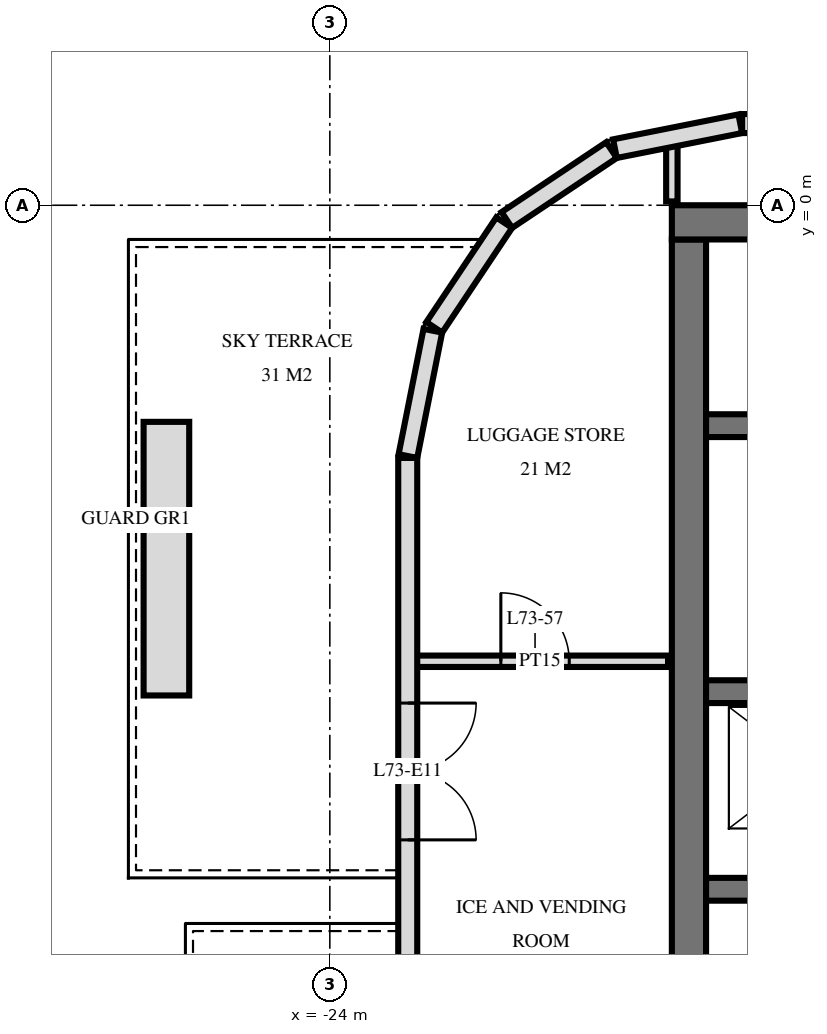
"""IFC4 building model, lengths in metres.
Left out: names, types, materials, properties, quantities, classifications, styles, units other than length and angle.
Written with IfcOpenShell. Run it as: python <this file> out.ifc"""

import sys

from ifc_helpers import new_model, si_unit, direction, frame, frame_2d, origin, place, context, subcontext, project, spatial, rectangle, extrude, element, fill, save


model = new_model("IFC4")
c1 = context("Model", 3, precision=1e-05, world=origin(), true_north=direction((0.0, 1.0)))
c2 = subcontext(c1, "Body", "Model", "MODEL_VIEW")
j1 = project(units=[si_unit("LENGTHUNIT", "METRE"), si_unit("PLANEANGLEUNIT", "RADIAN")], contexts=[c1])
p1 = place(None, origin())
s1 = spatial("IfcSite", under=j1, at=p1, CompositionType="ELEMENT")
p2 = place(p1, origin())
s2 = spatial("IfcBuilding", under=s1, at=p2, CompositionType="ELEMENT")
p3 = place(p2, frame((0.0, 0.0, 277.1)))
s3 = spatial("IfcBuildingStorey", under=s2, at=p3, CompositionType="ELEMENT", Elevation=277.1)
p4 = place(p3, frame((-19.5, -0.225, 0.0), z_axis=(0.0, 0.0, 1.0), x_axis=(1.0, 0.0, 0.0)))
e1 = element("IfcWall", 1, at=p4, inside=s3, PredefinedType="SHEAR", context=c2, shape_type="SweptSolid", body=[
    extrude(rectangle(XDim=9.5, YDim=0.45, at=frame_2d((4.75, 0.0))), origin(), (0.0, 0.0, 1.0), 3.5),
])
p5 = place(p3, frame((-19.275, -14.55, 0.0), z_axis=(0.0, 0.0, 1.0), x_axis=(0.0, 1.0, 0.0)))
e2 = element("IfcWall", 2, at=p5, inside=s3, PredefinedType="SHEAR", context=c2, shape_type="SweptSolid", body=[
    extrude(rectangle(XDim=14.1, YDim=0.45, at=frame_2d((7.05, 0.0))), origin(), (0.0, 0.0, 1.0), 3.5),
])
p6 = place(p3, frame((-19.05, -2.9, 0.0), z_axis=(0.0, 0.0, 1.0), x_axis=(1.0, 0.0, 0.0)))
e3 = element("IfcWall", 3, at=p6, inside=s3, PredefinedType="SHEAR", context=c2, shape_type="SweptSolid", body=[
    extrude(rectangle(XDim=8.7, YDim=0.3, at=frame_2d((4.35, 0.0))), origin(), (0.0, 0.0, 1.0), 3.5),
])
p7 = place(p6, frame((6.8, 0.0, 0.0)))
e4 = element("IfcOpeningElement", 4, at=p7, cuts=e3, PredefinedType="OPENING", context=c2, shape_type="SweptSolid", body=[
    extrude(rectangle(XDim=1.1, YDim=2.1, at=frame_2d((0.55, 1.05))), frame((0.0, 0.16, 0.0), z_axis=(0.0, -1.0, 0.0), x_axis=(1.0, 0.0, 0.0)), (0.0, 0.0, 1.0), 0.32),
])
p8 = place(p6, frame((3.8, 0.0, 0.0)))
e5 = element("IfcOpeningElement", 5, at=p8, cuts=e3, PredefinedType="OPENING", context=c2, shape_type="SweptSolid", body=[
    extrude(rectangle(XDim=1.1, YDim=2.1, at=frame_2d((0.55, 1.05))), frame((0.0, 0.16, 0.0), z_axis=(0.0, -1.0, 0.0), x_axis=(1.0, 0.0, 0.0)), (0.0, 0.0, 1.0), 0.32),
])
p9 = place(p6, frame((0.9, 0.0, 0.0)))
e6 = element("IfcOpeningElement", 6, at=p9, cuts=e3, PredefinedType="OPENING", context=c2, shape_type="SweptSolid", body=[
    extrude(rectangle(XDim=0.9, YDim=2.1, at=frame_2d((0.45, 1.05))), frame((0.0, 0.16, 0.0), z_axis=(0.0, -1.0, 0.0), x_axis=(1.0, 0.0, 0.0)), (0.0, 0.0, 1.0), 0.32),
])
p10 = place(p3, frame((-19.05, -6.4, 0.0), z_axis=(0.0, 0.0, 1.0), x_axis=(1.0, 0.0, 0.0)))
e7 = element("IfcWall", 7, at=p10, inside=s3, PredefinedType="SHEAR", context=c2, shape_type="SweptSolid", body=[
    extrude(rectangle(XDim=8.7, YDim=0.3, at=frame_2d((4.35, 0.0))), origin(), (0.0, 0.0, 1.0), 3.5),
])
p11 = place(p10, frame((0.8, 0.0, 0.0)))
e8 = element("IfcOpeningElement", 8, at=p11, cuts=e7, PredefinedType="OPENING", context=c2, shape_type="SweptSolid", body=[
    extrude(rectangle(XDim=1.1, YDim=2.1, at=frame_2d((0.55, 1.05))), frame((0.0, 0.16, 0.0), z_axis=(0.0, -1.0, 0.0), x_axis=(1.0, 0.0, 0.0)), (0.0, 0.0, 1.0), 0.32),
])
p12 = place(p3, frame((-19.05, -9.0, 0.0), z_axis=(0.0, 0.0, 1.0), x_axis=(1.0, 0.0, 0.0)))
e9 = element("IfcWall", 9, at=p12, inside=s3, PredefinedType="SHEAR", context=c2, shape_type="SweptSolid", body=[
    extrude(rectangle(XDim=8.7, YDim=0.3, at=frame_2d((4.35, 0.0))), origin(), (0.0, 0.0, 1.0), 3.5),
])
p13 = place(p12, frame((3.8, 0.0, 0.0)))
e10 = element("IfcOpeningElement", 10, at=p13, cuts=e9, PredefinedType="OPENING", context=c2, shape_type="SweptSolid", body=[
    extrude(rectangle(XDim=1.1, YDim=2.1, at=frame_2d((0.55, 1.05))), frame((0.0, 0.16, 0.0), z_axis=(0.0, -1.0, 0.0), x_axis=(1.0, 0.0, 0.0)), (0.0, 0.0, 1.0), 0.32),
])
p14 = place(p3, frame((18.575, 1.075, 0.0), z_axis=(0.0, 0.0, 1.0), x_axis=(-1.0, 0.0, 0.0)))
e11 = element("IfcWall", 11, at=p14, inside=s3, PredefinedType="SOLIDWALL", context=c2, shape_type="SweptSolid", body=[
    extrude(rectangle(XDim=37.151, YDim=0.25, at=frame_2d((18.575, 0.0))), origin(), (0.0, 0.0, 1.0), 3.22),
])
p15 = place(p14, frame((15.275, 0.0, 0.9)))
e12 = element("IfcOpeningElement", 12, at=p15, cuts=e11, PredefinedType="OPENING", context=c2, shape_type="SweptSolid", body=[
    extrude(rectangle(XDim=2.4, YDim=1.5, at=frame_2d((1.2, 0.75))), frame((0.0, 0.135, 0.0), z_axis=(0.0, -1.0, 0.0), x_axis=(1.0, 0.0, 0.0)), (0.0, 0.0, 1.0), 0.27),
])
p16 = place(p14, frame((21.275, 0.0, 0.9)))
e13 = element("IfcOpeningElement", 13, at=p16, cuts=e11, PredefinedType="OPENING", context=c2, shape_type="SweptSolid", body=[
    extrude(rectangle(XDim=2.4, YDim=1.5, at=frame_2d((1.2, 0.75))), frame((0.0, 0.135, 0.0), z_axis=(0.0, -1.0, 0.0), x_axis=(1.0, 0.0, 0.0)), (0.0, 0.0, 1.0), 0.27),
])
p17 = place(p14, frame((24.275, 0.0, 0.9)))
e14 = element("IfcOpeningElement", 14, at=p17, cuts=e11, PredefinedType="OPENING", context=c2, shape_type="SweptSolid", body=[
    extrude(rectangle(XDim=2.4, YDim=1.5, at=frame_2d((1.2, 0.75))), frame((0.0, 0.135, 0.0), z_axis=(0.0, -1.0, 0.0), x_axis=(1.0, 0.0, 0.0)), (0.0, 0.0, 1.0), 0.27),
])
p18 = place(p3, frame((-18.6, 1.073, 0.0), z_axis=(0.0, 0.0, 1.0), x_axis=(-0.980797896849, -0.195026884138, 0.0)))
e15 = element("IfcWall", 15, at=p18, inside=s3, PredefinedType="SOLIDWALL", context=c2, shape_type="SweptSolid", body=[
    extrude(rectangle(XDim=1.681, YDim=0.25, at=frame_2d((0.841, 0.0))), origin(), (0.0, 0.0, 1.0), 3.22),
])
for number, where, z_axis, x_axis in (
    (16, (-20.294, 0.726, 0.0), (0.0, 0.0, 1.0), (-0.831, -0.556, 0.0)),
    (17, (-21.706, -0.229, 0.0), (0.0, 0.0, 1.0), (-0.556, -0.831, 0.0)),
):
    element("IfcWall", number, at=place(p3, frame(where, z_axis=z_axis, x_axis=x_axis)), inside=s3, PredefinedType="SOLIDWALL", context=c2, shape_type="SweptSolid", body=[
        extrude(rectangle(XDim=1.656, YDim=0.25, at=frame_2d((0.828, 0.0))), origin(), (0.0, 0.0, 1.0), 3.22),
    ])
p19 = place(p3, frame((-22.645, -1.651, 0.0), z_axis=(0.0, 0.0, 1.0), x_axis=(-0.19513878023, -0.980775640221, 0.0)))
e18 = element("IfcWall", 18, at=p19, inside=s3, PredefinedType="SOLIDWALL", context=c2, shape_type="SweptSolid", body=[
    extrude(rectangle(XDim=1.681, YDim=0.25, at=frame_2d((0.841, 0.0))), origin(), (0.0, 0.0, 1.0), 3.22),
])
p20 = place(p3, frame((-22.975, -3.325, 0.0), z_axis=(0.0, 0.0, 1.0), x_axis=(0.0, -1.0, 0.0)))
e19 = element("IfcWall", 19, at=p20, inside=s3, PredefinedType="SOLIDWALL", context=c2, shape_type="SweptSolid", body=[
    extrude(rectangle(XDim=25.951, YDim=0.25, at=frame_2d((12.975, 0.0))), origin(), (0.0, 0.0, 1.0), 3.22),
])
p21 = place(p20, frame((3.225, 0.0, 0.0)))
e20 = element("IfcOpeningElement", 20, at=p21, cuts=e19, PredefinedType="OPENING", context=c2, shape_type="SweptSolid", body=[
    extrude(rectangle(XDim=1.8, YDim=2.4, at=frame_2d((0.9, 1.2))), frame((0.0, 0.135, 0.0), z_axis=(0.0, -1.0, 0.0), x_axis=(1.0, 0.0, 0.0)), (0.0, 0.0, 1.0), 0.27),
])
p22 = place(p20, frame((7.975, 0.0, 0.0)))
e21 = element("IfcOpeningElement", 21, at=p22, cuts=e19, PredefinedType="OPENING", context=c2, shape_type="SweptSolid", body=[
    extrude(rectangle(XDim=1.8, YDim=2.4, at=frame_2d((0.9, 1.2))), frame((0.0, 0.135, 0.0), z_axis=(0.0, -1.0, 0.0), x_axis=(1.0, 0.0, 0.0)), (0.0, 0.0, 1.0), 0.27),
])
p23 = place(p20, frame((12.275, 0.0, 0.9)))
e22 = element("IfcOpeningElement", 22, at=p23, cuts=e19, PredefinedType="OPENING", context=c2, shape_type="SweptSolid", body=[
    extrude(rectangle(XDim=1.2, YDim=1.5, at=frame_2d((0.6, 0.75))), frame((0.0, 0.135, 0.0), z_axis=(0.0, -1.0, 0.0), x_axis=(1.0, 0.0, 0.0)), (0.0, 0.0, 1.0), 0.27),
])
p24 = place(p20, frame((18.175, 0.0, 0.0)))
e23 = element("IfcOpeningElement", 23, at=p24, cuts=e19, PredefinedType="OPENING", context=c2, shape_type="SweptSolid", body=[
    extrude(rectangle(XDim=1.8, YDim=2.4, at=frame_2d((0.9, 1.2))), frame((0.0, 0.135, 0.0), z_axis=(0.0, -1.0, 0.0), x_axis=(1.0, 0.0, 0.0)), (0.0, 0.0, 1.0), 0.27),
])
p25 = place(p20, frame((21.075, 0.0, 0.0)))
e24 = element("IfcOpeningElement", 24, at=p25, cuts=e19, PredefinedType="OPENING", context=c2, shape_type="SweptSolid", body=[
    extrude(rectangle(XDim=1.8, YDim=2.4, at=frame_2d((0.9, 1.2))), frame((0.0, 0.135, 0.0), z_axis=(0.0, -1.0, 0.0), x_axis=(1.0, 0.0, 0.0)), (0.0, 0.0, 1.0), 0.27),
])
p26 = place(p20, frame((23.825, 0.0, 0.9)))
e25 = element("IfcOpeningElement", 25, at=p26, cuts=e19, PredefinedType="OPENING", context=c2, shape_type="SweptSolid", body=[
    extrude(rectangle(XDim=1.8, YDim=1.5, at=frame_2d((0.9, 0.75))), frame((0.0, 0.135, 0.0), z_axis=(0.0, -1.0, 0.0), x_axis=(1.0, 0.0, 0.0)), (0.0, 0.0, 1.0), 0.27),
])
p27 = place(p3, frame((-26.15, -6.45, 0.0), z_axis=(0.0, 0.0, 1.0), x_axis=(0.0, 1.0, 0.0)))
e26 = element("IfcWall", 26, at=p27, inside=s3, PredefinedType="USERDEFINED", context=c2, shape_type="SweptSolid", body=[
    extrude(rectangle(XDim=3.6, YDim=0.6, at=frame_2d((1.8, 0.0))), origin(), (0.0, 0.0, 1.0), 0.65),
])
p28 = place(p3, frame((-19.5, 0.05, 0.0), z_axis=(0.0, 0.0, 1.0), x_axis=(0.0, 1.0, 0.0)))
e27 = element("IfcWall", 27, at=p28, inside=s3, PredefinedType="PARTITIONING", context=c2, shape_type="SweptSolid", body=[
    extrude(rectangle(XDim=0.787, YDim=0.15, at=frame_2d((0.394, 0.0))), origin(), (0.0, 0.0, 1.0), 3.22),
])
p29 = place(p3, frame((-22.92, -6.0, 0.0), z_axis=(0.0, 0.0, 1.0), x_axis=(1.0, 0.0, 0.0)))
e28 = element("IfcWall", 28, at=p29, inside=s3, PredefinedType="PARTITIONING", context=c2, shape_type="SweptSolid", body=[
    extrude(rectangle(XDim=3.37, YDim=0.15, at=frame_2d((1.685, 0.0))), origin(), (0.0, 0.0, 1.0), 3.22),
])
p30 = place(p29, frame((1.17, 0.0, 0.0)))
e29 = element("IfcOpeningElement", 29, at=p30, cuts=e28, PredefinedType="OPENING", context=c2, shape_type="SweptSolid", body=[
    extrude(rectangle(XDim=0.9, YDim=2.1, at=frame_2d((0.45, 1.05))), frame((0.0, 0.085, 0.0), z_axis=(0.0, -1.0, 0.0), x_axis=(1.0, 0.0, 0.0)), (0.0, 0.0, 1.0), 0.17),
])
p31 = place(p21, origin())
e30 = element("IfcDoor", 30, at=p31, inside=s3, OperationType="DOUBLE_DOOR_SINGLE_SWING", PredefinedType="DOOR", context=c2, shape_type="SweptSolid", body=[
    extrude(rectangle(XDim=1.8, YDim=2.4, at=frame_2d((0.9, 1.2))), frame((0.0, 0.025, 0.0), z_axis=(0.0, -1.0, 0.0), x_axis=(1.0, 0.0, 0.0)), (0.0, 0.0, 1.0), 0.05),
])
fill(e20, e30)
p32 = place(p30, origin())
e31 = element("IfcDoor", 31, at=p32, inside=s3, OperationType="SINGLE_SWING_RIGHT", PredefinedType="DOOR", context=c2, shape_type="SweptSolid", body=[
    extrude(rectangle(XDim=0.9, YDim=2.1, at=frame_2d((0.45, 1.05))), frame((0.0, 0.025, 0.0), z_axis=(0.0, -1.0, 0.0), x_axis=(1.0, 0.0, 0.0)), (0.0, 0.0, 1.0), 0.05),
])
fill(e29, e31)
save(model, sys.argv[1])
